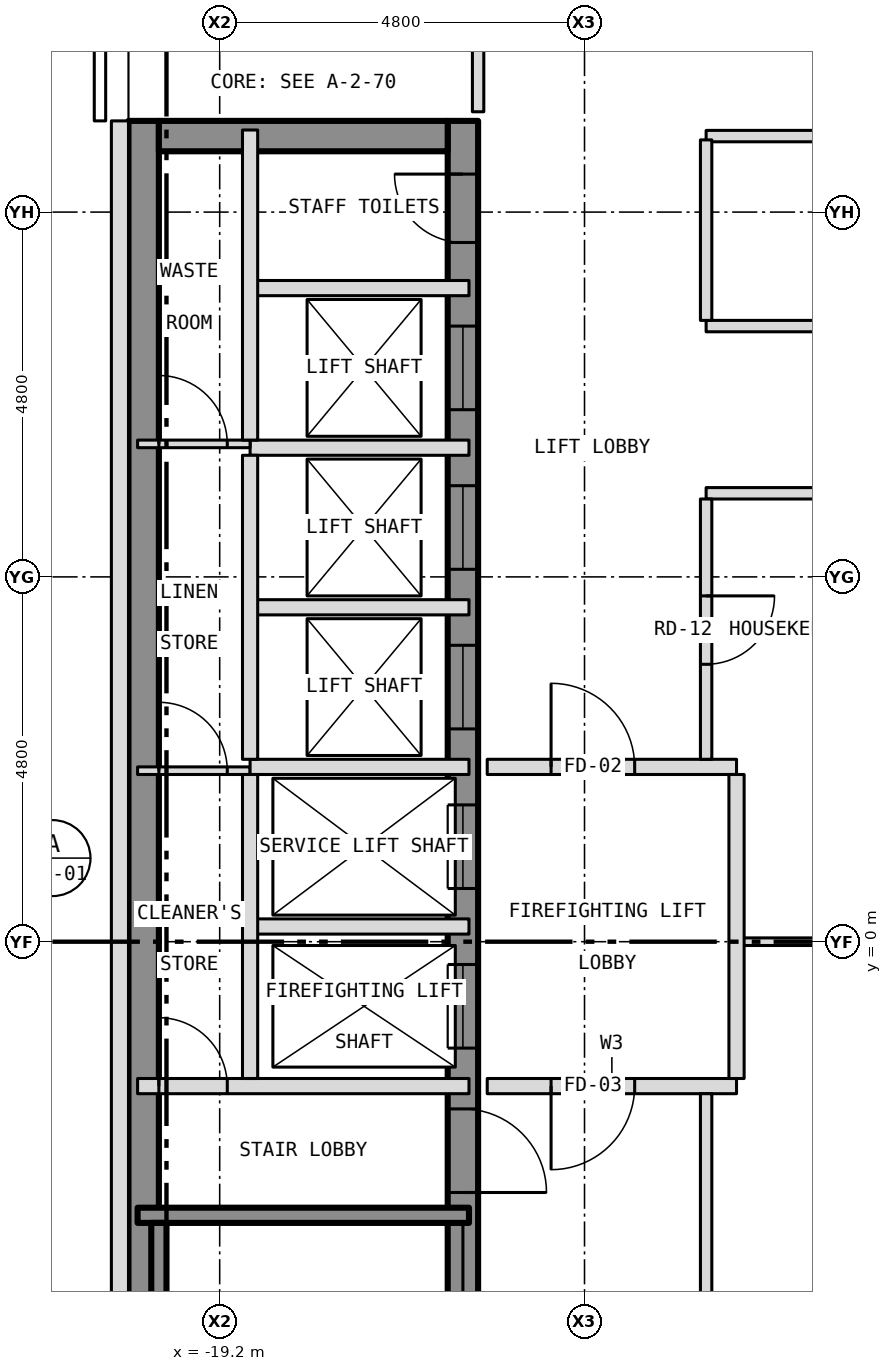
"""IFC4 building model, lengths in metres.
Left out: names, types, materials, properties, quantities, classifications, styles, units other than length and angle.
Written with IfcOpenShell. Run it as: python <this file> out.ifc"""

import sys

from ifc_helpers import new_model, si_unit, direction, frame, frame_2d, origin, place, context, subcontext, project, spatial, rectangle, extrude, element, fill, save


model = new_model("IFC4")
c1 = context("Model", 3, precision=1e-05, world=origin(), true_north=direction((0.0, 1.0)))
c2 = subcontext(c1, "Body", "Model", "MODEL_VIEW")
j1 = project(units=[si_unit("LENGTHUNIT", "METRE"), si_unit("PLANEANGLEUNIT", "RADIAN")], contexts=[c1])
p1 = place(None, origin())
s1 = spatial("IfcSite", under=j1, at=p1, CompositionType="ELEMENT")
p2 = place(p1, origin())
s2 = spatial("IfcBuilding", under=s1, at=p2, CompositionType="ELEMENT")
p3 = place(p2, frame((0.0, 0.0, 255.0)))
s3 = spatial("IfcBuildingStorey", under=s2, at=p3, CompositionType="ELEMENT", Elevation=255.0)
p4 = place(p3, frame((-16.0, -10.8, 0.0), z_axis=(0.0, 0.0, 1.0), x_axis=(0.0, 1.0, 0.0)))
e1 = element("IfcWall", 1, at=p4, inside=s3, PredefinedType="SHEAR", context=c2, shape_type="SweptSolid", body=[
    extrude(rectangle(XDim=21.6, YDim=0.4, at=frame_2d((10.8, 0.0))), origin(), (0.0, 0.0, 1.0), 3.25),
])
p5 = place(p4, frame((9.4, 0.0, 0.0)))
e2 = element("IfcOpeningElement", 2, at=p5, cuts=e1, PredefinedType="OPENING", context=c2, shape_type="SweptSolid", body=[
    extrude(rectangle(XDim=1.1, YDim=2.1, at=frame_2d((0.55, 1.05))), frame((0.0, 0.212, 0.0), z_axis=(0.0, -1.0, 0.0), x_axis=(1.0, 0.0, 0.0)), (0.0, 0.0, 1.0), 0.424),
])
p6 = place(p4, frame((11.5, 0.0, 0.0)))
e3 = element("IfcOpeningElement", 3, at=p6, cuts=e1, PredefinedType="OPENING", context=c2, shape_type="SweptSolid", body=[
    extrude(rectangle(XDim=1.1, YDim=2.1, at=frame_2d((0.55, 1.05))), frame((0.0, 0.212, 0.0), z_axis=(0.0, -1.0, 0.0), x_axis=(1.0, 0.0, 0.0)), (0.0, 0.0, 1.0), 0.424),
])
p7 = place(p4, frame((13.6, 0.0, 0.0)))
e4 = element("IfcOpeningElement", 4, at=p7, cuts=e1, PredefinedType="OPENING", context=c2, shape_type="SweptSolid", body=[
    extrude(rectangle(XDim=1.1, YDim=2.1, at=frame_2d((0.55, 1.05))), frame((0.0, 0.212, 0.0), z_axis=(0.0, -1.0, 0.0), x_axis=(1.0, 0.0, 0.0)), (0.0, 0.0, 1.0), 0.424),
])
p8 = place(p4, frame((15.7, 0.0, 0.0)))
e5 = element("IfcOpeningElement", 5, at=p8, cuts=e1, PredefinedType="OPENING", context=c2, shape_type="SweptSolid", body=[
    extrude(rectangle(XDim=1.1, YDim=2.1, at=frame_2d((0.55, 1.05))), frame((0.0, 0.212, 0.0), z_axis=(0.0, -1.0, 0.0), x_axis=(1.0, 0.0, 0.0)), (0.0, 0.0, 1.0), 0.424),
])
p9 = place(p4, frame((17.8, 0.0, 0.0)))
e6 = element("IfcOpeningElement", 6, at=p9, cuts=e1, PredefinedType="OPENING", context=c2, shape_type="SweptSolid", body=[
    extrude(rectangle(XDim=1.1, YDim=2.1, at=frame_2d((0.55, 1.05))), frame((0.0, 0.212, 0.0), z_axis=(0.0, -1.0, 0.0), x_axis=(1.0, 0.0, 0.0)), (0.0, 0.0, 1.0), 0.424),
])
p10 = place(p4, frame((0.458, 0.0, 0.0)))
e7 = element("IfcOpeningElement", 7, at=p10, cuts=e1, PredefinedType="OPENING", context=c2, shape_type="SweptSolid", body=[
    extrude(rectangle(XDim=1.1, YDim=2.1, at=frame_2d((0.55, 1.05))), frame((0.0, 0.212, 0.0), z_axis=(0.0, -1.0, 0.0), x_axis=(1.0, 0.0, 0.0)), (0.0, 0.0, 1.0), 0.424),
])
p11 = place(p4, frame((7.5, 0.0, 0.0)))
e8 = element("IfcOpeningElement", 8, at=p11, cuts=e1, PredefinedType="OPENING", context=c2, shape_type="SweptSolid", body=[
    extrude(rectangle(XDim=1.1, YDim=2.1, at=frame_2d((0.55, 1.05))), frame((0.0, 0.212, 0.0), z_axis=(0.0, -1.0, 0.0), x_axis=(1.0, 0.0, 0.0)), (0.0, 0.0, 1.0), 0.424),
])
p12 = place(p4, frame((20.0, 0.0, 0.0)))
e9 = element("IfcOpeningElement", 9, at=p12, cuts=e1, PredefinedType="OPENING", context=c2, shape_type="SweptSolid", body=[
    extrude(rectangle(XDim=0.9, YDim=2.1, at=frame_2d((0.45, 1.05))), frame((0.0, 0.212, 0.0), z_axis=(0.0, -1.0, 0.0), x_axis=(1.0, 0.0, 0.0)), (0.0, 0.0, 1.0), 0.424),
])
p13 = place(p3, frame((-20.2, -10.8, 0.0), z_axis=(0.0, 0.0, 1.0), x_axis=(0.0, 1.0, 0.0)))
e10 = element("IfcWall", 10, at=p13, inside=s3, PredefinedType="SHEAR", context=c2, shape_type="SweptSolid", body=[
    extrude(rectangle(XDim=21.6, YDim=0.4, at=frame_2d((10.8, 0.0))), origin(), (0.0, 0.0, 1.0), 3.25),
])
p14 = place(p3, frame((-20.0, 10.6, 0.0), z_axis=(0.0, 0.0, 1.0), x_axis=(1.0, 0.0, 0.0)))
e11 = element("IfcWall", 11, at=p14, inside=s3, PredefinedType="SHEAR", context=c2, shape_type="SweptSolid", body=[
    extrude(rectangle(XDim=3.8, YDim=0.4, at=frame_2d((1.9, 0.0))), origin(), (0.0, 0.0, 1.0), 3.25),
])
p15 = place(p3, frame((-20.512, 10.8, 0.0), z_axis=(0.0, 0.0, 1.0), x_axis=(0.0, -1.0, 0.0)))
e12 = element("IfcWall", 12, at=p15, inside=s3, PredefinedType="SOLIDWALL", context=c2, shape_type="SweptSolid", body=[
    extrude(rectangle(XDim=21.6, YDim=0.225, at=frame_2d((10.8, 0.0))), origin(), (0.0, 0.0, 1.0), 3.5),
])
p16 = place(p15, frame((18.05, 0.0, 1.0)))
e13 = element("IfcOpeningElement", 13, at=p16, cuts=e12, PredefinedType="OPENING", context=c2, shape_type="SweptSolid", body=[
    extrude(rectangle(XDim=0.6, YDim=1.5, at=frame_2d((0.3, 0.75))), frame((0.0, 0.125, 0.0), z_axis=(0.0, -1.0, 0.0), x_axis=(1.0, 0.0, 0.0)), (0.0, 0.0, 1.0), 0.249),
])
p17 = place(p3, frame((-20.28, -3.6, 0.0), z_axis=(0.0, 0.0, 1.0), x_axis=(1.0, 0.0, 0.0)))
e14 = element("IfcWall", 14, at=p17, inside=s3, PredefinedType="SHEAR", context=c2, shape_type="SweptSolid", body=[
    extrude(rectangle(XDim=4.36, YDim=0.2, at=frame_2d((2.18, 0.0))), origin(), (0.0, 0.0, 1.0), 3.25),
])
p18 = place(p3, frame((-20.28, -1.9, 0.0), z_axis=(0.0, 0.0, 1.0), x_axis=(1.0, 0.0, 0.0)))
e15 = element("IfcWall", 15, at=p18, inside=s3, PredefinedType="PARTITIONING", context=c2, shape_type="SweptSolid", body=[
    extrude(rectangle(XDim=4.36, YDim=0.2, at=frame_2d((2.18, 0.0))), origin(), (0.0, 0.0, 1.0), 3.25),
])
p19 = place(p18, frame((0.28, 0.0, 0.0)))
e16 = element("IfcOpeningElement", 16, at=p19, cuts=e15, PredefinedType="OPENING", context=c2, shape_type="SweptSolid", body=[
    extrude(rectangle(XDim=0.9, YDim=2.1, at=frame_2d((0.45, 1.05))), frame((0.0, 0.112, 0.0), z_axis=(0.0, -1.0, 0.0), x_axis=(1.0, 0.0, 0.0)), (0.0, 0.0, 1.0), 0.224),
])
p20 = place(p3, frame((-15.68, -1.9, 0.0), z_axis=(0.0, 0.0, 1.0), x_axis=(1.0, 0.0, 0.0)))
e17 = element("IfcWall", 17, at=p20, inside=s3, PredefinedType="PARTITIONING", context=c2, shape_type="SweptSolid", body=[
    extrude(rectangle(XDim=3.28, YDim=0.2, at=frame_2d((1.64, 0.0))), origin(), (0.0, 0.0, 1.0), 3.35),
])
p21 = place(p20, frame((0.84, 0.0, 0.0)))
e18 = element("IfcOpeningElement", 18, at=p21, cuts=e17, PredefinedType="OPENING", context=c2, shape_type="SweptSolid", body=[
    extrude(rectangle(XDim=1.1, YDim=2.1, at=frame_2d((0.55, 1.05))), frame((0.0, 0.112, 0.0), z_axis=(0.0, -1.0, 0.0), x_axis=(1.0, 0.0, 0.0)), (0.0, 0.0, 1.0), 0.224),
])
p22 = place(p3, frame((-12.4, 0.0, 0.0), z_axis=(0.0, 0.0, 1.0), x_axis=(1.0, 0.0, 0.0)))
e19 = element("IfcWall", 19, at=p22, inside=s3, PredefinedType="PARTITIONING", context=c2, shape_type="SweptSolid", body=[
    extrude(rectangle(XDim=2.616, YDim=0.1, at=frame_2d((1.308, 0.0))), origin(), (0.0, 0.0, 1.0), 2.728),
])
p23 = place(p3, frame((-18.8, 0.2, 0.0), z_axis=(0.0, 0.0, 1.0), x_axis=(1.0, 0.0, 0.0)))
e20 = element("IfcWall", 20, at=p23, inside=s3, PredefinedType="PARTITIONING", context=c2, shape_type="SweptSolid", body=[
    extrude(rectangle(XDim=2.88, YDim=0.2, at=frame_2d((1.44, 0.0))), origin(), (0.0, 0.0, 1.0), 3.25),
])
p24 = place(p3, frame((-20.28, 2.25, 0.0), z_axis=(0.0, 0.0, 1.0), x_axis=(1.0, 0.0, 0.0)))
e21 = element("IfcWall", 21, at=p24, inside=s3, PredefinedType="PARTITIONING", context=c2, shape_type="SweptSolid", body=[
    extrude(rectangle(XDim=1.48, YDim=0.1, at=frame_2d((0.74, 0.0))), origin(), (0.0, 0.0, 1.0), 3.25),
])
p25 = place(p24, frame((0.28, 0.0, 0.0)))
e22 = element("IfcOpeningElement", 22, at=p25, cuts=e21, PredefinedType="OPENING", context=c2, shape_type="SweptSolid", body=[
    extrude(rectangle(XDim=0.9, YDim=2.1, at=frame_2d((0.45, 1.05))), frame((0.0, 0.062, 0.0), z_axis=(0.0, -1.0, 0.0), x_axis=(1.0, 0.0, 0.0)), (0.0, 0.0, 1.0), 0.124),
])
p26 = place(p3, frame((-18.8, 2.3, 0.0), z_axis=(0.0, 0.0, 1.0), x_axis=(1.0, 0.0, 0.0)))
e23 = element("IfcWall", 23, at=p26, inside=s3, PredefinedType="PARTITIONING", context=c2, shape_type="SweptSolid", body=[
    extrude(rectangle(XDim=2.88, YDim=0.2, at=frame_2d((1.44, 0.0))), origin(), (0.0, 0.0, 1.0), 3.25),
])
p27 = place(p3, frame((-15.68, 2.3, 0.0), z_axis=(0.0, 0.0, 1.0), x_axis=(1.0, 0.0, 0.0)))
e24 = element("IfcWall", 24, at=p27, inside=s3, PredefinedType="PARTITIONING", context=c2, shape_type="SweptSolid", body=[
    extrude(rectangle(XDim=3.28, YDim=0.2, at=frame_2d((1.64, 0.0))), origin(), (0.0, 0.0, 1.0), 3.35),
])
p28 = place(p27, frame((0.84, 0.0, 0.0)))
e25 = element("IfcOpeningElement", 25, at=p28, cuts=e24, PredefinedType="OPENING", context=c2, shape_type="SweptSolid", body=[
    extrude(rectangle(XDim=1.1, YDim=2.1, at=frame_2d((0.55, 1.05))), frame((0.0, 0.112, 0.0), z_axis=(0.0, -1.0, 0.0), x_axis=(1.0, 0.0, 0.0)), (0.0, 0.0, 1.0), 0.224),
])
p29 = place(p3, frame((-18.8, 4.4, 0.0), z_axis=(0.0, 0.0, 1.0), x_axis=(1.0, 0.0, 0.0)))
e26 = element("IfcWall", 26, at=p29, inside=s3, PredefinedType="PARTITIONING", context=c2, shape_type="SweptSolid", body=[
    extrude(rectangle(XDim=2.88, YDim=0.2, at=frame_2d((1.44, 0.0))), origin(), (0.0, 0.0, 1.0), 3.25),
])
p30 = place(p3, frame((-12.8, 5.9, 0.0), z_axis=(0.0, 0.0, 1.0), x_axis=(1.0, 0.0, 0.0)))
e27 = element("IfcWall", 27, at=p30, inside=s3, PredefinedType="PARTITIONING", context=c2, shape_type="SweptSolid", body=[
    extrude(rectangle(XDim=15.4, YDim=0.15, at=frame_2d((7.7, 0.0))), origin(), (0.0, 0.0, 1.0), 3.35),
])
p31 = place(p30, frame((8.85, 0.0, 0.0)))
e28 = element("IfcOpeningElement", 28, at=p31, cuts=e27, PredefinedType="OPENING", context=c2, shape_type="SweptSolid", body=[
    extrude(rectangle(XDim=0.9, YDim=2.1, at=frame_2d((0.45, 1.05))), frame((0.0, 0.087, 0.0), z_axis=(0.0, -1.0, 0.0), x_axis=(1.0, 0.0, 0.0)), (0.0, 0.0, 1.0), 0.174),
])
p32 = place(p3, frame((-18.8, 6.5, 0.0), z_axis=(0.0, 0.0, 1.0), x_axis=(1.0, 0.0, 0.0)))
e29 = element("IfcWall", 29, at=p32, inside=s3, PredefinedType="PARTITIONING", context=c2, shape_type="SweptSolid", body=[
    extrude(rectangle(XDim=2.88, YDim=0.2, at=frame_2d((1.44, 0.0))), origin(), (0.0, 0.0, 1.0), 3.25),
])
p33 = place(p3, frame((-20.28, 6.55, 0.0), z_axis=(0.0, 0.0, 1.0), x_axis=(1.0, 0.0, 0.0)))
e30 = element("IfcWall", 30, at=p33, inside=s3, PredefinedType="PARTITIONING", context=c2, shape_type="SweptSolid", body=[
    extrude(rectangle(XDim=1.48, YDim=0.1, at=frame_2d((0.74, 0.0))), origin(), (0.0, 0.0, 1.0), 3.25),
])
p34 = place(p33, frame((0.28, 0.0, 0.0)))
e31 = element("IfcOpeningElement", 31, at=p34, cuts=e30, PredefinedType="OPENING", context=c2, shape_type="SweptSolid", body=[
    extrude(rectangle(XDim=0.9, YDim=2.1, at=frame_2d((0.45, 1.05))), frame((0.0, 0.062, 0.0), z_axis=(0.0, -1.0, 0.0), x_axis=(1.0, 0.0, 0.0)), (0.0, 0.0, 1.0), 0.124),
])
p35 = place(p3, frame((-12.8, 8.1, 0.0), z_axis=(0.0, 0.0, 1.0), x_axis=(1.0, 0.0, 0.0)))
e32 = element("IfcWall", 32, at=p35, inside=s3, PredefinedType="PARTITIONING", context=c2, shape_type="SweptSolid", body=[
    extrude(rectangle(XDim=15.4, YDim=0.15, at=frame_2d((7.7, 0.0))), origin(), (0.0, 0.0, 1.0), 3.35),
])
p36 = place(p3, frame((-18.8, 8.6, 0.0), z_axis=(0.0, 0.0, 1.0), x_axis=(1.0, 0.0, 0.0)))
e33 = element("IfcWall", 33, at=p36, inside=s3, PredefinedType="PARTITIONING", context=c2, shape_type="SweptSolid", body=[
    extrude(rectangle(XDim=2.88, YDim=0.2, at=frame_2d((1.44, 0.0))), origin(), (0.0, 0.0, 1.0), 3.25),
])
p37 = place(p3, frame((-12.8, 10.6, 0.0), z_axis=(0.0, 0.0, 1.0), x_axis=(1.0, 0.0, 0.0)))
e34 = element("IfcWall", 34, at=p37, inside=s3, PredefinedType="PARTITIONING", context=c2, shape_type="SweptSolid", body=[
    extrude(rectangle(XDim=15.4, YDim=0.15, at=frame_2d((7.7, 0.0))), origin(), (0.0, 0.0, 1.0), 3.35),
])
p38 = place(p37, frame((8.85, 0.0, 0.0)))
e35 = element("IfcOpeningElement", 35, at=p38, cuts=e34, PredefinedType="OPENING", context=c2, shape_type="SweptSolid", body=[
    extrude(rectangle(XDim=0.9, YDim=2.1, at=frame_2d((0.45, 1.05))), frame((0.0, 0.087, 0.0), z_axis=(0.0, -1.0, 0.0), x_axis=(1.0, 0.0, 0.0)), (0.0, 0.0, 1.0), 0.174),
])
p39 = place(p3, frame((-20.0, -10.68, 0.0), z_axis=(0.0, 0.0, 1.0), x_axis=(0.0, 1.0, 0.0)))
e36 = element("IfcWall", 36, at=p39, inside=s3, PredefinedType="SHEAR", context=c2, shape_type="SweptSolid", body=[
    extrude(rectangle(XDim=6.98, YDim=0.2, at=frame_2d((3.49, 0.0))), origin(), (0.0, 0.0, 1.0), 3.25),
])
for number, where, z_axis, x_axis in (
    (37, (-18.8, -1.8, 0.0), (0.0, 0.0, 1.0), (0.0, 1.0, 0.0)),
    (38, (-18.8, 2.4, 0.0), (0.0, 0.0, 1.0), (0.0, 1.0, 0.0)),
):
    element("IfcWall", number, at=place(p3, frame(where, z_axis=z_axis, x_axis=x_axis)), inside=s3, PredefinedType="PARTITIONING", context=c2, shape_type="SweptSolid", body=[
        extrude(rectangle(XDim=4.0, YDim=0.2, at=frame_2d((2.0, 0.0))), origin(), (0.0, 0.0, 1.0), 3.25),
    ])
p40 = place(p3, frame((-18.8, 6.6, 0.0), z_axis=(0.0, 0.0, 1.0), x_axis=(0.0, 1.0, 0.0)))
e39 = element("IfcWall", 39, at=p40, inside=s3, PredefinedType="PARTITIONING", context=c2, shape_type="SweptSolid", body=[
    extrude(rectangle(XDim=4.08, YDim=0.2, at=frame_2d((2.04, 0.0))), origin(), (0.0, 0.0, 1.0), 3.25),
])
p41 = place(p3, frame((-15.8, 10.92, 0.0), z_axis=(0.0, 0.0, 1.0), x_axis=(0.0, 1.0, 0.0)))
e40 = element("IfcWall", 40, at=p41, inside=s3, PredefinedType="PARTITIONING", context=c2, shape_type="SweptSolid", body=[
    extrude(rectangle(XDim=1.805, YDim=0.15, at=frame_2d((0.903, 0.0))), origin(), (0.0, 0.0, 1.0), 3.35),
])
p42 = place(p3, frame((-12.8, -10.525, 0.0), z_axis=(0.0, 0.0, 1.0), x_axis=(0.0, 1.0, 0.0)))
e41 = element("IfcWall", 41, at=p42, inside=s3, PredefinedType="PARTITIONING", context=c2, shape_type="SweptSolid", body=[
    extrude(rectangle(XDim=8.525, YDim=0.15, at=frame_2d((4.262, 0.0))), origin(), (0.0, 0.0, 1.0), 3.35),
])
p43 = place(p42, frame((3.825, 0.0, 0.0)))
e42 = element("IfcOpeningElement", 42, at=p43, cuts=e41, PredefinedType="OPENING", context=c2, shape_type="SweptSolid", body=[
    extrude(rectangle(XDim=0.9, YDim=2.1, at=frame_2d((0.45, 1.05))), frame((0.0, 0.087, 0.0), z_axis=(0.0, -1.0, 0.0), x_axis=(1.0, 0.0, 0.0)), (0.0, 0.0, 1.0), 0.174),
])
p44 = place(p3, frame((-12.8, 2.4, 0.0), z_axis=(0.0, 0.0, 1.0), x_axis=(0.0, 1.0, 0.0)))
e43 = element("IfcWall", 43, at=p44, inside=s3, PredefinedType="PARTITIONING", context=c2, shape_type="SweptSolid", body=[
    extrude(rectangle(XDim=3.425, YDim=0.15, at=frame_2d((1.712, 0.0))), origin(), (0.0, 0.0, 1.0), 3.35),
])
p45 = place(p44, frame((1.25, 0.0, 0.0)))
e44 = element("IfcOpeningElement", 44, at=p45, cuts=e43, PredefinedType="OPENING", context=c2, shape_type="SweptSolid", body=[
    extrude(rectangle(XDim=0.9, YDim=2.1, at=frame_2d((0.45, 1.05))), frame((0.0, 0.087, 0.0), z_axis=(0.0, -1.0, 0.0), x_axis=(1.0, 0.0, 0.0)), (0.0, 0.0, 1.0), 0.174),
])
p46 = place(p3, frame((-12.8, 8.175, 0.0), z_axis=(0.0, 0.0, 1.0), x_axis=(0.0, 1.0, 0.0)))
e45 = element("IfcWall", 45, at=p46, inside=s3, PredefinedType="PARTITIONING", context=c2, shape_type="SweptSolid", body=[
    extrude(rectangle(XDim=2.375, YDim=0.15, at=frame_2d((1.188, 0.0))), origin(), (0.0, 0.0, 1.0), 3.35),
])
p47 = place(p3, frame((-12.4, -1.8, 0.0), z_axis=(0.0, 0.0, 1.0), x_axis=(0.0, 1.0, 0.0)))
e46 = element("IfcWall", 46, at=p47, inside=s3, PredefinedType="PARTITIONING", context=c2, shape_type="SweptSolid", body=[
    extrude(rectangle(XDim=4.0, YDim=0.2, at=frame_2d((2.0, 0.0))), origin(), (0.0, 0.0, 1.0), 3.35),
])
p48 = place(p5, origin())
e47 = element("IfcDoor", 47, at=p48, inside=s3, OperationType="SLIDING_TO_LEFT", PredefinedType="DOOR", context=c2, shape_type="SweptSolid", body=[
    extrude(rectangle(XDim=1.1, YDim=2.1, at=frame_2d((0.55, 1.05))), frame((0.0, 0.025, 0.0), z_axis=(0.0, -1.0, 0.0), x_axis=(1.0, 0.0, 0.0)), (0.0, 0.0, 1.0), 0.05),
])
fill(e2, e47)
p49 = place(p6, origin())
e48 = element("IfcDoor", 48, at=p49, inside=s3, OperationType="SLIDING_TO_LEFT", PredefinedType="DOOR", context=c2, shape_type="SweptSolid", body=[
    extrude(rectangle(XDim=1.1, YDim=2.1, at=frame_2d((0.55, 1.05))), frame((0.0, 0.025, 0.0), z_axis=(0.0, -1.0, 0.0), x_axis=(1.0, 0.0, 0.0)), (0.0, 0.0, 1.0), 0.05),
])
fill(e3, e48)
p50 = place(p7, origin())
e49 = element("IfcDoor", 49, at=p50, inside=s3, OperationType="SLIDING_TO_LEFT", PredefinedType="DOOR", context=c2, shape_type="SweptSolid", body=[
    extrude(rectangle(XDim=1.1, YDim=2.1, at=frame_2d((0.55, 1.05))), frame((0.0, 0.025, 0.0), z_axis=(0.0, -1.0, 0.0), x_axis=(1.0, 0.0, 0.0)), (0.0, 0.0, 1.0), 0.05),
])
fill(e4, e49)
p51 = place(p8, origin())
e50 = element("IfcDoor", 50, at=p51, inside=s3, OperationType="SLIDING_TO_LEFT", PredefinedType="DOOR", context=c2, shape_type="SweptSolid", body=[
    extrude(rectangle(XDim=1.1, YDim=2.1, at=frame_2d((0.55, 1.05))), frame((0.0, 0.025, 0.0), z_axis=(0.0, -1.0, 0.0), x_axis=(1.0, 0.0, 0.0)), (0.0, 0.0, 1.0), 0.05),
])
fill(e5, e50)
p52 = place(p9, origin())
e51 = element("IfcDoor", 51, at=p52, inside=s3, OperationType="SLIDING_TO_LEFT", PredefinedType="DOOR", context=c2, shape_type="SweptSolid", body=[
    extrude(rectangle(XDim=1.1, YDim=2.1, at=frame_2d((0.55, 1.05))), frame((0.0, 0.025, 0.0), z_axis=(0.0, -1.0, 0.0), x_axis=(1.0, 0.0, 0.0)), (0.0, 0.0, 1.0), 0.05),
])
fill(e6, e51)
p53 = place(p11, origin())
e52 = element("IfcDoor", 52, at=p53, inside=s3, OperationType="SINGLE_SWING_LEFT", PredefinedType="DOOR", context=c2, shape_type="SweptSolid", body=[
    extrude(rectangle(XDim=1.1, YDim=2.1, at=frame_2d((0.55, 1.05))), frame((0.0, 0.025, 0.0), z_axis=(0.0, -1.0, 0.0), x_axis=(1.0, 0.0, 0.0)), (0.0, 0.0, 1.0), 0.05),
])
fill(e8, e52)
p54 = place(p12, origin())
e53 = element("IfcDoor", 53, at=p54, inside=s3, OperationType="SINGLE_SWING_RIGHT", PredefinedType="DOOR", context=c2, shape_type="SweptSolid", body=[
    extrude(rectangle(XDim=0.9, YDim=2.1, at=frame_2d((0.45, 1.05))), frame((0.0, 0.025, 0.0), z_axis=(0.0, -1.0, 0.0), x_axis=(1.0, 0.0, 0.0)), (0.0, 0.0, 1.0), 0.05),
])
fill(e9, e53)
p55 = place(p19, origin())
e54 = element("IfcDoor", 54, at=p55, inside=s3, OperationType="SINGLE_SWING_LEFT", PredefinedType="DOOR", context=c2, shape_type="SweptSolid", body=[
    extrude(rectangle(XDim=0.9, YDim=2.1, at=frame_2d((0.45, 1.05))), frame((0.0, 0.025, 0.0), z_axis=(0.0, -1.0, 0.0), x_axis=(1.0, 0.0, 0.0)), (0.0, 0.0, 1.0), 0.05),
])
fill(e16, e54)
p56 = place(p25, origin())
e55 = element("IfcDoor", 55, at=p56, inside=s3, OperationType="SINGLE_SWING_LEFT", PredefinedType="DOOR", context=c2, shape_type="SweptSolid", body=[
    extrude(rectangle(XDim=0.9, YDim=2.1, at=frame_2d((0.45, 1.05))), frame((0.0, 0.025, 0.0), z_axis=(0.0, -1.0, 0.0), x_axis=(1.0, 0.0, 0.0)), (0.0, 0.0, 1.0), 0.05),
])
fill(e22, e55)
p57 = place(p34, origin())
e56 = element("IfcDoor", 56, at=p57, inside=s3, OperationType="SINGLE_SWING_LEFT", PredefinedType="DOOR", context=c2, shape_type="SweptSolid", body=[
    extrude(rectangle(XDim=0.9, YDim=2.1, at=frame_2d((0.45, 1.05))), frame((0.0, 0.025, 0.0), z_axis=(0.0, -1.0, 0.0), x_axis=(1.0, 0.0, 0.0)), (0.0, 0.0, 1.0), 0.05),
])
fill(e31, e56)
p58 = place(p28, origin())
e57 = element("IfcDoor", 57, at=p58, inside=s3, OperationType="SINGLE_SWING_LEFT", PredefinedType="DOOR", context=c2, shape_type="SweptSolid", body=[
    extrude(rectangle(XDim=1.1, YDim=2.1, at=frame_2d((0.55, 1.05))), frame((0.0, 0.025, 0.0), z_axis=(0.0, -1.0, 0.0), x_axis=(1.0, 0.0, 0.0)), (0.0, 0.0, 1.0), 0.05),
])
fill(e25, e57)
p59 = place(p21, origin())
e58 = element("IfcDoor", 58, at=p59, inside=s3, OperationType="SINGLE_SWING_LEFT", PredefinedType="DOOR", context=c2, shape_type="SweptSolid", body=[
    extrude(rectangle(XDim=1.1, YDim=2.1, at=frame_2d((0.55, 1.05))), frame((0.0, 0.025, 0.0), z_axis=(0.0, -1.0, 0.0), x_axis=(1.0, 0.0, 0.0)), (0.0, 0.0, 1.0), 0.05),
])
fill(e18, e58)
p60 = place(p45, origin())
e59 = element("IfcDoor", 59, at=p60, inside=s3, OperationType="SINGLE_SWING_RIGHT", PredefinedType="DOOR", context=c2, shape_type="SweptSolid", body=[
    extrude(rectangle(XDim=0.9, YDim=2.1, at=frame_2d((0.45, 1.05))), frame((0.0, 0.025, 0.0), z_axis=(0.0, -1.0, 0.0), x_axis=(1.0, 0.0, 0.0)), (0.0, 0.0, 1.0), 0.05),
])
fill(e44, e59)
save(model, sys.argv[1])
